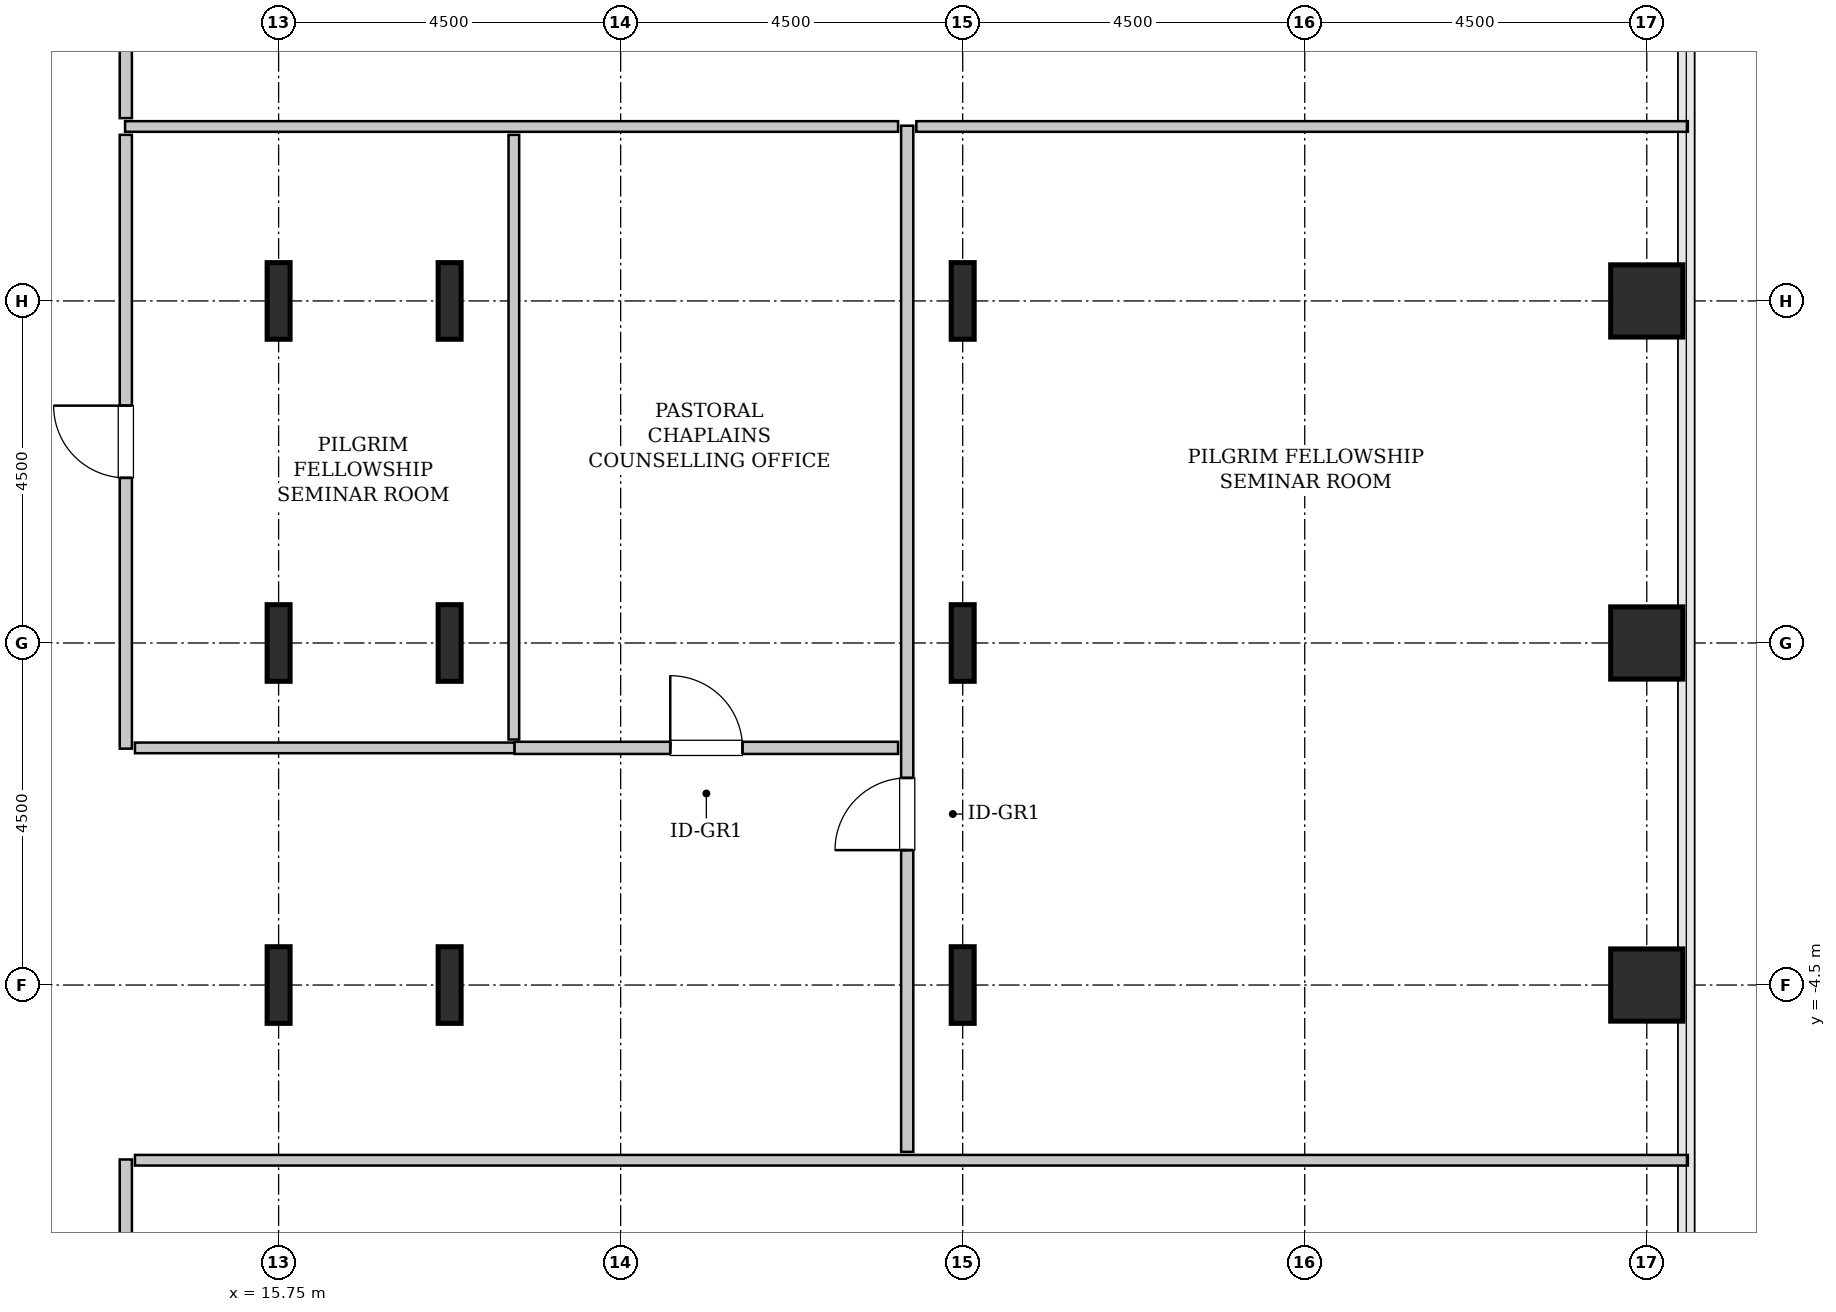
"""IFC4 building model, lengths in metres.
Left out: names, types, materials, properties, quantities, classifications, styles, units other than length and angle.
Written with IfcOpenShell. Run it as: python <this file> out.ifc"""

import sys

from ifc_helpers import new_model, si_unit, direction, frame, frame_2d, origin, origin_2d, place, context, subcontext, project, spatial, rectangle, hollow_rectangle, i_section, extrude, source, transform, mapped, element, fill, save


model = new_model("IFC4")
c1 = context("Model", 3, precision=1e-05, world=origin(), true_north=direction((0.0, 1.0)))
c2 = subcontext(c1, "Body", "Model", "MODEL_VIEW")
j1 = project(units=[si_unit("LENGTHUNIT", "METRE"), si_unit("PLANEANGLEUNIT", "RADIAN")], contexts=[c1])
p1 = place(None, origin())
s1 = spatial("IfcSite", under=j1, at=p1, CompositionType="ELEMENT")
p2 = place(p1, origin())
s2 = spatial("IfcBuilding", under=s1, at=p2, CompositionType="ELEMENT")
p3 = place(p2, frame((0.0, 0.0, 94.6)))
s3 = spatial("IfcBuildingStorey", under=s2, at=p3, CompositionType="ELEMENT", Elevation=94.6)
m1 = source(origin(), c2, "Body", "SweptSolid", [
    extrude(i_section(OverallWidth=0.302, OverallDepth=1.008, WebThickness=0.021, FlangeThickness=0.04, FilletRadius=0.03, at=origin_2d()), origin(), (0.0, 0.0, 1.0), 3.8),
])
for number, where, z_axis, x_axis in (
    (1, (15.75, -4.5, 0.0), (0.0, 0.0, 1.0), (1.0, 0.0, 0.0)),
    (2, (15.75, 0.0, 0.0), (0.0, 0.0, 1.0), (1.0, 0.0, 0.0)),
    (3, (15.75, 4.5, 0.0), (0.0, 0.0, 1.0), (1.0, 0.0, 0.0)),
    (4, (18.0, -4.5, 0.0), (0.0, 0.0, 1.0), (1.0, 0.0, 0.0)),
    (5, (18.0, 0.0, 0.0), (0.0, 0.0, 1.0), (1.0, 0.0, 0.0)),
    (6, (18.0, 4.5, 0.0), (0.0, 0.0, 1.0), (1.0, 0.0, 0.0)),
    (7, (24.75, -4.5, 0.0), (0.0, 0.0, 1.0), (1.0, 0.0, 0.0)),
    (8, (24.75, 0.0, 0.0), (0.0, 0.0, 1.0), (1.0, 0.0, 0.0)),
    (9, (24.75, 4.5, 0.0), (0.0, 0.0, 1.0), (1.0, 0.0, 0.0)),
):
    element("IfcColumn", number, at=place(p3, frame(where, z_axis=z_axis, x_axis=x_axis)), inside=s3, PredefinedType="COLUMN", context=c2, shape_type="MappedRepresentation", body=[
        mapped(m1, transform((0.0, 0.0, 0.0), x_axis=(1.0, 0.0, 0.0), y_axis=(0.0, 1.0, 0.0), z_axis=(0.0, 0.0, 1.0), scale=1.0)),
    ])
m2 = source(origin(), c2, "Body", "SweptSolid", [
    extrude(hollow_rectangle(XDim=0.95, YDim=0.95, WallThickness=0.045, InnerFilletRadius=0.045, OuterFilletRadius=0.09, at=origin_2d()), origin(), (0.0, 0.0, 1.0), 3.8),
])
for number, where, z_axis, x_axis in (
    (10, (33.75, -4.5, 0.0), (0.0, 0.0, 1.0), (1.0, 0.0, 0.0)),
    (11, (33.75, 0.0, 0.0), (0.0, 0.0, 1.0), (1.0, 0.0, 0.0)),
    (12, (33.75, 4.5, 0.0), (0.0, 0.0, 1.0), (1.0, 0.0, 0.0)),
):
    element("IfcColumn", number, at=place(p3, frame(where, z_axis=z_axis, x_axis=x_axis)), inside=s3, PredefinedType="COLUMN", context=c2, shape_type="MappedRepresentation", body=[
        mapped(m2, transform((0.0, 0.0, 0.0), x_axis=(1.0, 0.0, 0.0), y_axis=(0.0, 1.0, 0.0), z_axis=(0.0, 0.0, 1.0), scale=1.0)),
    ])
m3 = source(origin(), c2, "Body", "SweptSolid", [
    extrude(rectangle(XDim=16.245, YDim=0.16, at=frame_2d((8.123, 0.0))), origin(), (0.0, 0.0, 1.0), 3.535),
])
p4 = place(p3, frame((13.74, -23.04, 0.0), z_axis=(0.0, 0.0, 1.0), x_axis=(0.0, 1.0, 0.0)))
e13 = element("IfcWall", 13, at=p4, inside=s3, PredefinedType="PARTITIONING", context=c2, shape_type="MappedRepresentation", body=[
    mapped(m3, transform((0.0, 0.0, 0.0), x_axis=(1.0, 0.0, 0.0), y_axis=(0.0, 1.0, 0.0), z_axis=(0.0, 0.0, 1.0), scale=1.0)),
])
p5 = place(p4, frame((13.413, 0.0, 0.0)))
e14 = element("IfcOpeningElement", 14, at=p5, cuts=e13, PredefinedType="OPENING", context=c2, shape_type="SweptSolid", body=[
    extrude(rectangle(XDim=0.95, YDim=2.1, at=frame_2d((0.475, 1.05))), frame((0.0, 0.09, 0.0), z_axis=(0.0, -1.0, 0.0), x_axis=(1.0, 0.0, 0.0)), (0.0, 0.0, 1.0), 0.18),
])
m4 = source(origin(), c2, "Body", "SweptSolid", [
    extrude(rectangle(XDim=20.43, YDim=0.14, at=frame_2d((10.215, 0.0))), origin(), (0.0, 0.0, 1.0), 3.535),
])
p6 = place(p3, frame((13.86, -6.805, 0.0), z_axis=(0.0, 0.0, 1.0), x_axis=(1.0, 0.0, 0.0)))
e15 = element("IfcWall", 15, at=p6, inside=s3, PredefinedType="PARTITIONING", context=c2, shape_type="MappedRepresentation", body=[
    mapped(m4, transform((0.0, 0.0, 0.0), x_axis=(1.0, 0.0, 0.0), y_axis=(0.0, 1.0, 0.0), z_axis=(0.0, 0.0, 1.0), scale=1.0)),
])
m5 = source(origin(), c2, "Body", "SweptSolid", [
    extrude(rectangle(XDim=13.5, YDim=0.16, at=frame_2d((6.75, 0.0))), origin(), (0.0, 0.0, 1.0), 3.535),
])
p7 = place(p3, frame((24.02, -6.695, 0.0), z_axis=(0.0, 0.0, 1.0), x_axis=(0.0, 1.0, 0.0)))
e16 = element("IfcWall", 16, at=p7, inside=s3, PredefinedType="PARTITIONING", context=c2, shape_type="MappedRepresentation", body=[
    mapped(m5, transform((0.0, 0.0, 0.0), x_axis=(1.0, 0.0, 0.0), y_axis=(0.0, 1.0, 0.0), z_axis=(0.0, 0.0, 1.0), scale=1.0)),
])
p8 = place(p7, frame((3.97, 0.0, 0.0)))
e17 = element("IfcOpeningElement", 17, at=p8, cuts=e16, PredefinedType="OPENING", context=c2, shape_type="SweptSolid", body=[
    extrude(rectangle(XDim=0.95, YDim=2.1, at=frame_2d((0.475, 1.05))), frame((0.0, 0.09, 0.0), z_axis=(0.0, -1.0, 0.0), x_axis=(1.0, 0.0, 0.0)), (0.0, 0.0, 1.0), 0.18),
])
m6 = source(origin(), c2, "Body", "SweptSolid", [
    extrude(rectangle(XDim=10.17, YDim=0.14, at=frame_2d((5.085, 0.0))), origin(), (0.0, 0.0, 1.0), 3.535),
])
p9 = place(p3, frame((13.73, 6.795, 0.0), z_axis=(0.0, 0.0, 1.0), x_axis=(1.0, 0.0, 0.0)))
e18 = element("IfcWall", 18, at=p9, inside=s3, PredefinedType="PARTITIONING", context=c2, shape_type="MappedRepresentation", body=[
    mapped(m6, transform((0.0, 0.0, 0.0), x_axis=(1.0, 0.0, 0.0), y_axis=(0.0, 1.0, 0.0), z_axis=(0.0, 0.0, 1.0), scale=1.0)),
])
m7 = source(origin(), c2, "Body", "SweptSolid", [
    extrude(rectangle(XDim=10.15, YDim=0.14, at=frame_2d((5.075, 0.0))), origin(), (0.0, 0.0, 1.0), 3.535),
])
p10 = place(p3, frame((24.14, 6.795, 0.0), z_axis=(0.0, 0.0, 1.0), x_axis=(1.0, 0.0, 0.0)))
e19 = element("IfcWall", 19, at=p10, inside=s3, PredefinedType="PARTITIONING", context=c2, shape_type="MappedRepresentation", body=[
    mapped(m7, transform((0.0, 0.0, 0.0), x_axis=(1.0, 0.0, 0.0), y_axis=(0.0, 1.0, 0.0), z_axis=(0.0, 0.0, 1.0), scale=1.0)),
])
m8 = source(origin(), c2, "Body", "SweptSolid", [
    extrude(rectangle(XDim=8.075, YDim=0.16, at=frame_2d((4.038, 0.0))), origin(), (0.0, 0.0, 1.0), 3.535),
])
p11 = place(p3, frame((13.74, -1.39, 0.0), z_axis=(0.0, 0.0, 1.0), x_axis=(0.0, 1.0, 0.0)))
e20 = element("IfcWall", 20, at=p11, inside=s3, PredefinedType="PARTITIONING", context=c2, shape_type="MappedRepresentation", body=[
    mapped(m8, transform((0.0, 0.0, 0.0), x_axis=(1.0, 0.0, 0.0), y_axis=(0.0, 1.0, 0.0), z_axis=(0.0, 0.0, 1.0), scale=1.0)),
])
p12 = place(p11, frame((3.562, 0.0, 0.0)))
e21 = element("IfcOpeningElement", 21, at=p12, cuts=e20, PredefinedType="OPENING", context=c2, shape_type="SweptSolid", body=[
    extrude(rectangle(XDim=0.95, YDim=2.1, at=frame_2d((0.475, 1.05))), frame((0.0, 0.09, 0.0), z_axis=(0.0, -1.0, 0.0), x_axis=(1.0, 0.0, 0.0)), (0.0, 0.0, 1.0), 0.18),
])
m9 = source(origin(), c2, "Body", "SweptSolid", [
    extrude(rectangle(XDim=4.995, YDim=0.14, at=frame_2d((2.498, 0.0))), origin(), (0.0, 0.0, 1.0), 3.535),
])
p13 = place(p3, frame((13.86, -1.38, 0.0), z_axis=(0.0, 0.0, 1.0), x_axis=(1.0, 0.0, 0.0)))
e22 = element("IfcWall", 22, at=p13, inside=s3, PredefinedType="PARTITIONING", context=c2, shape_type="MappedRepresentation", body=[
    mapped(m9, transform((0.0, 0.0, 0.0), x_axis=(1.0, 0.0, 0.0), y_axis=(0.0, 1.0, 0.0), z_axis=(0.0, 0.0, 1.0), scale=1.0)),
])
m10 = source(origin(), c2, "Body", "SweptSolid", [
    extrude(rectangle(XDim=7.955, YDim=0.14, at=frame_2d((3.978, 0.0))), origin(), (0.0, 0.0, 1.0), 3.535),
])
p14 = place(p3, frame((18.845, -1.27, 0.0), z_axis=(0.0, 0.0, 1.0), x_axis=(0.0, 1.0, 0.0)))
e23 = element("IfcWall", 23, at=p14, inside=s3, PredefinedType="PARTITIONING", context=c2, shape_type="MappedRepresentation", body=[
    mapped(m10, transform((0.0, 0.0, 0.0), x_axis=(1.0, 0.0, 0.0), y_axis=(0.0, 1.0, 0.0), z_axis=(0.0, 0.0, 1.0), scale=1.0)),
])
m11 = source(origin(), c2, "Body", "SweptSolid", [
    extrude(rectangle(XDim=5.045, YDim=0.16, at=frame_2d((2.522, 0.0))), origin(), (0.0, 0.0, 1.0), 3.535),
])
p15 = place(p3, frame((18.855, -1.38, 0.0), z_axis=(0.0, 0.0, 1.0), x_axis=(1.0, 0.0, 0.0)))
e24 = element("IfcWall", 24, at=p15, inside=s3, PredefinedType="PARTITIONING", context=c2, shape_type="MappedRepresentation", body=[
    mapped(m11, transform((0.0, 0.0, 0.0), x_axis=(1.0, 0.0, 0.0), y_axis=(0.0, 1.0, 0.0), z_axis=(0.0, 0.0, 1.0), scale=1.0)),
])
p16 = place(p15, frame((2.048, 0.0, 0.0)))
e25 = element("IfcOpeningElement", 25, at=p16, cuts=e24, PredefinedType="OPENING", context=c2, shape_type="SweptSolid", body=[
    extrude(rectangle(XDim=0.95, YDim=2.1, at=frame_2d((0.475, 1.05))), frame((0.0, 0.09, 0.0), z_axis=(0.0, -1.0, 0.0), x_axis=(1.0, 0.0, 0.0)), (0.0, 0.0, 1.0), 0.18),
])
m12 = source(origin(), c2, "Body", "SweptSolid", [
    extrude(rectangle(XDim=16.135, YDim=0.16, at=frame_2d((8.067, 0.0))), origin(), (0.0, 0.0, 1.0), 3.535),
])
p17 = place(p3, frame((13.74, 6.905, 0.0), z_axis=(0.0, 0.0, 1.0), x_axis=(0.0, 1.0, 0.0)))
e26 = element("IfcWall", 26, at=p17, inside=s3, PredefinedType="PARTITIONING", context=c2, shape_type="MappedRepresentation", body=[
    mapped(m12, transform((0.0, 0.0, 0.0), x_axis=(1.0, 0.0, 0.0), y_axis=(0.0, 1.0, 0.0), z_axis=(0.0, 0.0, 1.0), scale=1.0)),
])
p18 = place(p17, frame((1.827, 0.0, 0.0)))
e27 = element("IfcOpeningElement", 27, at=p18, cuts=e26, PredefinedType="OPENING", context=c2, shape_type="SweptSolid", body=[
    extrude(rectangle(XDim=0.95, YDim=2.1, at=frame_2d((0.475, 1.05))), frame((0.0, 0.09, 0.0), z_axis=(0.0, -1.0, 0.0), x_axis=(1.0, 0.0, 0.0)), (0.0, 0.0, 1.0), 0.18),
])
m13 = source(origin(), c2, "Body", "SweptSolid", [
    extrude(rectangle(XDim=0.95, YDim=2.1, at=frame_2d((0.475, 1.05))), frame((0.0, 0.025, 0.0), z_axis=(0.0, -1.0, 0.0), x_axis=(1.0, 0.0, 0.0)), (0.0, 0.0, 1.0), 0.05),
])
p19 = place(p8, origin())
e28 = element("IfcDoor", 28, at=p19, inside=s3, OperationType="SINGLE_SWING_LEFT", PredefinedType="DOOR", context=c2, shape_type="MappedRepresentation", body=[
    mapped(m13, transform((0.0, 0.0, 0.0), x_axis=(1.0, 0.0, 0.0), y_axis=(0.0, 1.0, 0.0), z_axis=(0.0, 0.0, 1.0), scale=1.0)),
])
fill(e17, e28)
p20 = place(p12, origin())
e29 = element("IfcDoor", 29, at=p20, inside=s3, OperationType="SINGLE_SWING_RIGHT", PredefinedType="DOOR", context=c2, shape_type="MappedRepresentation", body=[
    mapped(m13, transform((0.0, 0.0, 0.0), x_axis=(1.0, 0.0, 0.0), y_axis=(0.0, 1.0, 0.0), z_axis=(0.0, 0.0, 1.0), scale=1.0)),
])
fill(e21, e29)
p21 = place(p16, origin())
e30 = element("IfcDoor", 30, at=p21, inside=s3, OperationType="SINGLE_SWING_LEFT", PredefinedType="DOOR", context=c2, shape_type="MappedRepresentation", body=[
    mapped(m13, transform((0.0, 0.0, 0.0), x_axis=(1.0, 0.0, 0.0), y_axis=(0.0, 1.0, 0.0), z_axis=(0.0, 0.0, 1.0), scale=1.0)),
])
fill(e25, e30)
save(model, sys.argv[1])
